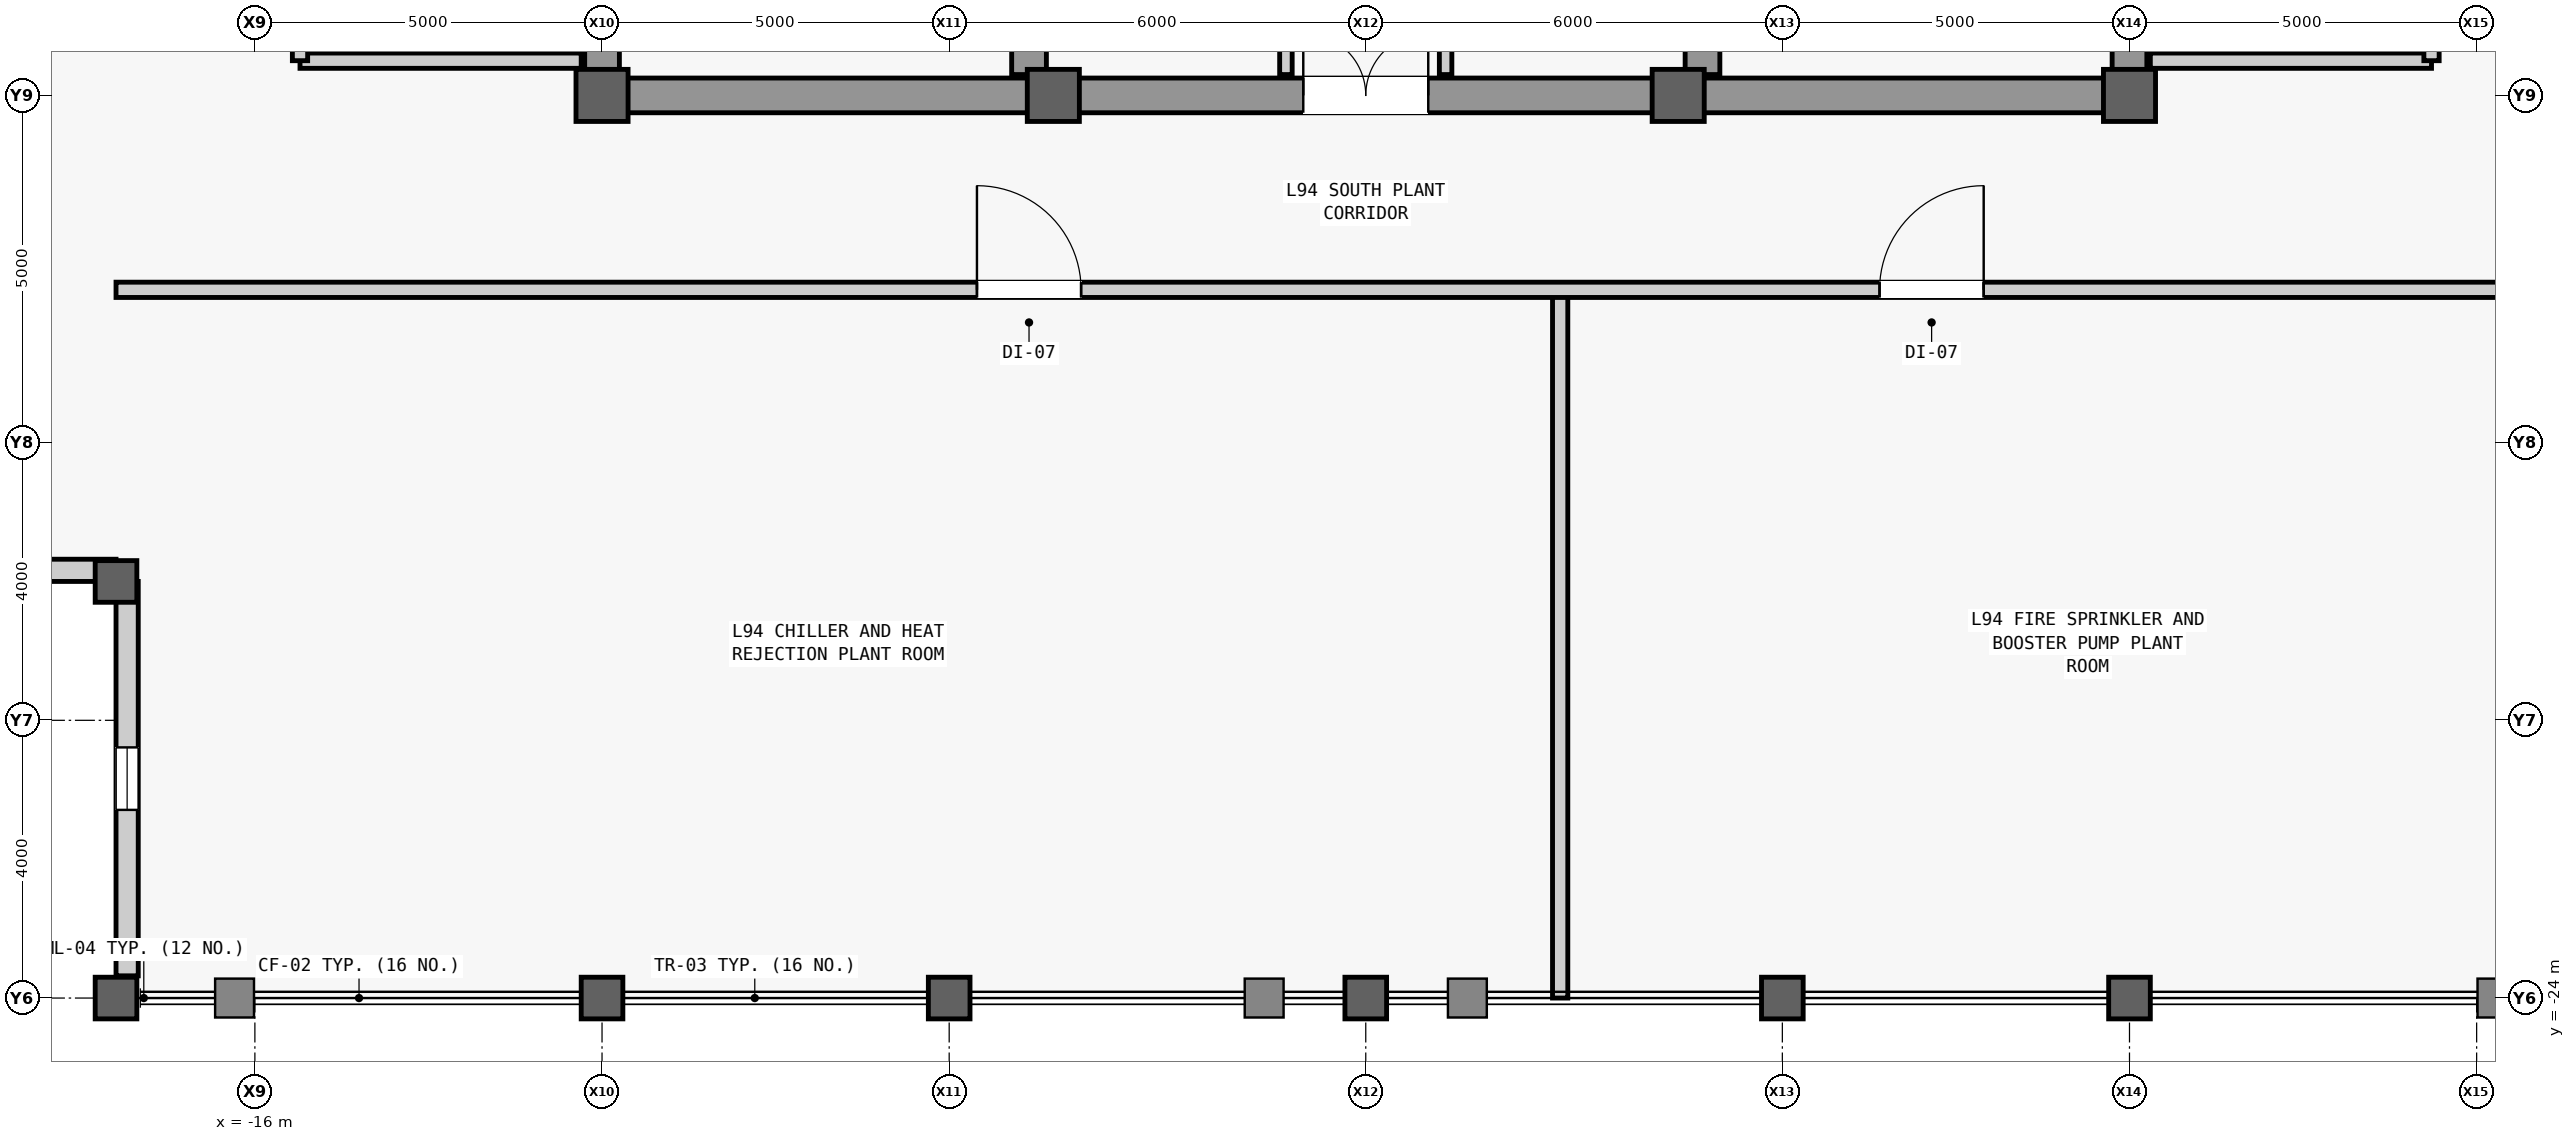
"""IFC4 building model, lengths in metres.
Left out: names, types, materials, properties, quantities, classifications, styles, units other than length and angle.
Written with IfcOpenShell. Run it as: python <this file> out.ifc"""

import sys

from ifc_helpers import new_model, si_unit, direction, frame, frame_2d, origin, origin_2d, place, context, subcontext, project, spatial, rectangle, hollow_rectangle, extrude, source, transform, mapped, element, fill, save


model = new_model("IFC4")
c1 = context("Model", 3, precision=1e-05, world=origin(), true_north=direction((0.0, 1.0)))
c2 = subcontext(c1, "Body", "Model", "MODEL_VIEW")
j1 = project(units=[si_unit("LENGTHUNIT", "METRE"), si_unit("PLANEANGLEUNIT", "RADIAN")], contexts=[c1])
p1 = place(None, origin())
s1 = spatial("IfcSite", under=j1, at=p1, CompositionType="ELEMENT")
p2 = place(p1, origin())
s2 = spatial("IfcBuilding", under=s1, at=p2, CompositionType="ELEMENT")
p3 = place(p2, frame((0.0, 0.0, 399.5)))
s3 = spatial("IfcBuildingStorey", under=s2, at=p3, CompositionType="ELEMENT", Elevation=399.5)
m1 = source(origin(), c2, "Body", "SweptSolid", [
    extrude(rectangle(XDim=22.0, YDim=0.5, at=frame_2d((11.0, 0.0))), origin(), (0.0, 0.0, 1.0), 4.5),
])
p4 = place(p3, frame((-11.0, -11.0, 0.0), z_axis=(0.0, 0.0, 1.0), x_axis=(0.0, 1.0, 0.0)))
e1 = element("IfcWall", 1, at=p4, inside=s3, PredefinedType="SHEAR", context=c2, shape_type="MappedRepresentation", body=[
    mapped(m1, transform((0.0, 0.0, 0.0), scale=1.0)),
])
m2 = source(origin(), c2, "Body", "SweptSolid", [
    extrude(rectangle(XDim=1.1, YDim=2.2, at=frame_2d((0.55, 1.1))), frame((0.0, 0.26, 0.0), z_axis=(0.0, -1.0, 0.0), x_axis=(1.0, 0.0, 0.0)), (0.0, 0.0, 1.0), 0.52),
])
p5 = place(p4, frame((0.8, 0.0, 0.0)))
e2 = element("IfcOpeningElement", 2, at=p5, cuts=e1, PredefinedType="OPENING", context=c2, shape_type="MappedRepresentation", body=[
    mapped(m2, transform((0.0, 0.0, 0.0), scale=1.0)),
])
p6 = place(p4, frame((12.5, 0.0, 0.0)))
e3 = element("IfcOpeningElement", 3, at=p6, cuts=e1, PredefinedType="OPENING", context=c2, shape_type="MappedRepresentation", body=[
    mapped(m2, transform((0.0, 0.0, 0.0), scale=1.0)),
])
m3 = source(origin(), c2, "Body", "SweptSolid", [
    extrude(rectangle(XDim=0.9, YDim=2.15, at=frame_2d((0.45, 1.075))), frame((0.0, 0.26, 0.0), z_axis=(0.0, -1.0, 0.0), x_axis=(1.0, 0.0, 0.0)), (0.0, 0.0, 1.0), 0.52),
])
p7 = place(p4, frame((7.575, 0.0, 0.0)))
e4 = element("IfcOpeningElement", 4, at=p7, cuts=e1, PredefinedType="OPENING", context=c2, shape_type="MappedRepresentation", body=[
    mapped(m3, transform((0.0, 0.0, 0.0), scale=1.0)),
])
m4 = source(origin(), c2, "Body", "SweptSolid", [
    extrude(rectangle(XDim=1.3, YDim=2.3, at=frame_2d((0.65, 1.15))), frame((0.0, 0.26, 0.0), z_axis=(0.0, -1.0, 0.0), x_axis=(1.0, 0.0, 0.0)), (0.0, 0.0, 1.0), 0.52),
])
p8 = place(p4, frame((2.7, 0.0, 0.0)))
e5 = element("IfcOpeningElement", 5, at=p8, cuts=e1, PredefinedType="OPENING", context=c2, shape_type="MappedRepresentation", body=[
    mapped(m4, transform((0.0, 0.0, 0.0), scale=1.0)),
])
p9 = place(p3, frame((11.0, -11.0, 0.0), z_axis=(0.0, 0.0, 1.0), x_axis=(0.0, 1.0, 0.0)))
e6 = element("IfcWall", 6, at=p9, inside=s3, PredefinedType="SHEAR", context=c2, shape_type="MappedRepresentation", body=[
    mapped(m1, transform((0.0, 0.0, 0.0), scale=1.0)),
])
p10 = place(p9, frame((0.8, 0.0, 0.0)))
e7 = element("IfcOpeningElement", 7, at=p10, cuts=e6, PredefinedType="OPENING", context=c2, shape_type="MappedRepresentation", body=[
    mapped(m2, transform((0.0, 0.0, 0.0), scale=1.0)),
])
p11 = place(p9, frame((7.575, 0.0, 0.0)))
e8 = element("IfcOpeningElement", 8, at=p11, cuts=e6, PredefinedType="OPENING", context=c2, shape_type="MappedRepresentation", body=[
    mapped(m3, transform((0.0, 0.0, 0.0), scale=1.0)),
])
p12 = place(p9, frame((2.7, 0.0, 0.0)))
e9 = element("IfcOpeningElement", 9, at=p12, cuts=e6, PredefinedType="OPENING", context=c2, shape_type="MappedRepresentation", body=[
    mapped(m4, transform((0.0, 0.0, 0.0), scale=1.0)),
])
p13 = place(p9, frame((13.35, 0.0, 0.0)))
e10 = element("IfcOpeningElement", 10, at=p13, cuts=e6, PredefinedType="OPENING", context=c2, shape_type="MappedRepresentation", body=[
    mapped(m4, transform((0.0, 0.0, 0.0), scale=1.0)),
])
m5 = source(origin(), c2, "Body", "SweptSolid", [
    extrude(rectangle(XDim=21.4, YDim=0.5, at=frame_2d((10.7, 0.0))), origin(), (0.0, 0.0, 1.0), 4.5),
])
for number, where, z_axis, x_axis in (
    (11, (-4.85, -10.7, 0.0), (0.0, 0.0, 1.0), (0.0, 1.0, 0.0)),
    (12, (4.85, -10.7, 0.0), (0.0, 0.0, 1.0), (0.0, 1.0, 0.0)),
):
    element("IfcWall", number, at=place(p3, frame(where, z_axis=z_axis, x_axis=x_axis)), inside=s3, PredefinedType="SHEAR", context=c2, shape_type="MappedRepresentation", body=[
        mapped(m5, transform((0.0, 0.0, 0.0), scale=1.0)),
    ])
m6 = source(origin(), c2, "Body", "SweptSolid", [
    extrude(rectangle(XDim=5.9, YDim=0.5, at=frame_2d((2.95, 0.0))), origin(), (0.0, 0.0, 1.0), 4.5),
])
for number, where, z_axis, x_axis in (
    (13, (-10.75, -11.0, 0.0), (0.0, 0.0, 1.0), (1.0, 0.0, 0.0)),
    (14, (4.85, -11.0, 0.0), (0.0, 0.0, 1.0), (1.0, 0.0, 0.0)),
):
    element("IfcWall", number, at=place(p3, frame(where, z_axis=z_axis, x_axis=x_axis)), inside=s3, PredefinedType="SHEAR", context=c2, shape_type="MappedRepresentation", body=[
        mapped(m6, transform((0.0, 0.0, 0.0), scale=1.0)),
    ])
m7 = source(origin(), c2, "Body", "SweptSolid", [
    extrude(rectangle(XDim=9.2, YDim=0.5, at=frame_2d((4.6, 0.0))), origin(), (0.0, 0.0, 1.0), 4.5),
])
p14 = place(p3, frame((-4.6, -11.0, 0.0), z_axis=(0.0, 0.0, 1.0), x_axis=(1.0, 0.0, 0.0)))
e15 = element("IfcWall", 15, at=p14, inside=s3, PredefinedType="SHEAR", context=c2, shape_type="MappedRepresentation", body=[
    mapped(m7, transform((0.0, 0.0, 0.0), scale=1.0)),
])
m8 = source(origin(), c2, "Body", "SweptSolid", [
    extrude(rectangle(XDim=1.8, YDim=2.25, at=frame_2d((0.9, 1.125))), frame((0.0, 0.26, 0.0), z_axis=(0.0, -1.0, 0.0), x_axis=(1.0, 0.0, 0.0)), (0.0, 0.0, 1.0), 0.52),
])
p15 = place(p14, frame((3.7, 0.0, 0.0)))
e16 = element("IfcOpeningElement", 16, at=p15, cuts=e15, PredefinedType="OPENING", context=c2, shape_type="MappedRepresentation", body=[
    mapped(m8, transform((0.0, 0.0, 0.0), scale=1.0)),
])
m9 = source(origin(), c2, "Body", "SweptSolid", [
    extrude(hollow_rectangle(XDim=0.6, YDim=0.6, WallThickness=0.035, at=origin_2d()), origin(), (0.0, 0.0, 1.0), 4.8),
])
for number, where, z_axis, x_axis in (
    (17, (-18.0, -24.0, 0.0), (0.0, 0.0, 1.0), (1.0, 0.0, 0.0)),
    (18, (-18.0, -18.0, 0.0), (0.0, 0.0, 1.0), (1.0, 0.0, 0.0)),
    (19, (-11.0, -24.0, 0.0), (0.0, 0.0, 1.0), (1.0, 0.0, 0.0)),
):
    element("IfcColumn", number, at=place(p3, frame(where, z_axis=z_axis, x_axis=x_axis)), inside=s3, PredefinedType="COLUMN", context=c2, shape_type="MappedRepresentation", body=[
        mapped(m9, transform((0.0, 0.0, 0.0), scale=1.0)),
    ])
m10 = source(origin(), c2, "Body", "SweptSolid", [
    extrude(rectangle(XDim=0.75, YDim=0.75, at=origin_2d()), origin(), (0.0, 0.0, 1.0), 4.8),
])
p16 = place(p3, frame((-11.0, -11.0, 0.0), z_axis=(0.0, 0.0, 1.0), x_axis=(1.0, 0.0, 0.0)))
e20 = element("IfcColumn", 20, at=p16, inside=s3, PredefinedType="COLUMN", context=c2, shape_type="MappedRepresentation", body=[
    mapped(m10, transform((0.0, 0.0, 0.0), scale=1.0)),
])
p17 = place(p3, frame((-6.0, -24.0, 0.0), z_axis=(0.0, 0.0, 1.0), x_axis=(1.0, 0.0, 0.0)))
e21 = element("IfcColumn", 21, at=p17, inside=s3, PredefinedType="COLUMN", context=c2, shape_type="MappedRepresentation", body=[
    mapped(m9, transform((0.0, 0.0, 0.0), scale=1.0)),
])
p18 = place(p3, frame((-4.5, -11.0, 0.0), z_axis=(0.0, 0.0, 1.0), x_axis=(1.0, 0.0, 0.0)))
e22 = element("IfcColumn", 22, at=p18, inside=s3, PredefinedType="COLUMN", context=c2, shape_type="MappedRepresentation", body=[
    mapped(m10, transform((0.0, 0.0, 0.0), scale=1.0)),
])
p19 = place(p3, frame((0.0, -24.0, 0.0), z_axis=(0.0, 0.0, 1.0), x_axis=(1.0, 0.0, 0.0)))
e23 = element("IfcColumn", 23, at=p19, inside=s3, PredefinedType="COLUMN", context=c2, shape_type="MappedRepresentation", body=[
    mapped(m9, transform((0.0, 0.0, 0.0), scale=1.0)),
])
p20 = place(p3, frame((4.5, -11.0, 0.0), z_axis=(0.0, 0.0, 1.0), x_axis=(1.0, 0.0, 0.0)))
e24 = element("IfcColumn", 24, at=p20, inside=s3, PredefinedType="COLUMN", context=c2, shape_type="MappedRepresentation", body=[
    mapped(m10, transform((0.0, 0.0, 0.0), scale=1.0)),
])
for number, where, z_axis, x_axis in (
    (25, (6.0, -24.0, 0.0), (0.0, 0.0, 1.0), (1.0, 0.0, 0.0)),
    (26, (11.0, -24.0, 0.0), (0.0, 0.0, 1.0), (1.0, 0.0, 0.0)),
):
    element("IfcColumn", number, at=place(p3, frame(where, z_axis=z_axis, x_axis=x_axis)), inside=s3, PredefinedType="COLUMN", context=c2, shape_type="MappedRepresentation", body=[
        mapped(m9, transform((0.0, 0.0, 0.0), scale=1.0)),
    ])
p21 = place(p3, frame((11.0, -11.0, 0.0), z_axis=(0.0, 0.0, 1.0), x_axis=(1.0, 0.0, 0.0)))
e27 = element("IfcColumn", 27, at=p21, inside=s3, PredefinedType="COLUMN", context=c2, shape_type="MappedRepresentation", body=[
    mapped(m10, transform((0.0, 0.0, 0.0), scale=1.0)),
])
m11 = source(origin(), c2, "Body", "SweptSolid", [
    extrude(rectangle(XDim=5.68, YDim=0.32, at=frame_2d((2.84, 0.0))), origin(), (0.0, 0.0, 1.0), 3.951),
])
p22 = place(p3, frame((-18.0, -17.84, 0.0), z_axis=(0.0, 0.0, 1.0), x_axis=(-1.0, 0.0, 0.0)))
e28 = element("IfcWall", 28, at=p22, inside=s3, PredefinedType="STANDARD", context=c2, shape_type="MappedRepresentation", body=[
    mapped(m11, transform((0.0, 0.0, 0.0), scale=1.0)),
])
m12 = source(origin(), c2, "Body", "SweptSolid", [
    extrude(rectangle(XDim=0.9, YDim=2.4, at=frame_2d((0.45, 1.2))), frame((0.0, 0.17, 0.0), z_axis=(0.0, -1.0, 0.0), x_axis=(1.0, 0.0, 0.0)), (0.0, 0.0, 1.0), 0.34),
])
p23 = place(p22, frame((2.39, 0.0, 0.7)))
e29 = element("IfcOpeningElement", 29, at=p23, cuts=e28, PredefinedType="OPENING", context=c2, shape_type="MappedRepresentation", body=[
    mapped(m12, transform((0.0, 0.0, 0.0), scale=1.0)),
])
p24 = place(p3, frame((-17.84, -23.68, 0.0), z_axis=(0.0, 0.0, 1.0), x_axis=(0.0, 1.0, 0.0)))
e30 = element("IfcWall", 30, at=p24, inside=s3, PredefinedType="STANDARD", context=c2, shape_type="MappedRepresentation", body=[
    mapped(m11, transform((0.0, 0.0, 0.0), scale=1.0)),
])
p25 = place(p24, frame((2.39, 0.0, 0.7)))
e31 = element("IfcOpeningElement", 31, at=p25, cuts=e30, PredefinedType="OPENING", context=c2, shape_type="MappedRepresentation", body=[
    mapped(m12, transform((0.0, 0.0, 0.0), scale=1.0)),
])
m13 = source(origin(), c2, "Body", "SweptSolid", [
    extrude(rectangle(XDim=4.05, YDim=0.22, at=frame_2d((2.025, 0.0))), origin(), (0.0, 0.0, 1.0), 4.5),
])
p26 = place(p3, frame((-15.35, -10.5, 0.0), z_axis=(0.0, 0.0, 1.0), x_axis=(1.0, 0.0, 0.0)))
e32 = element("IfcWall", 32, at=p26, inside=s3, PredefinedType="PARTITIONING", context=c2, shape_type="MappedRepresentation", body=[
    mapped(m13, transform((0.0, 0.0, 0.0), scale=1.0)),
])
m14 = source(origin(), c2, "Body", "SweptSolid", [
    extrude(rectangle(XDim=4.4, YDim=0.22, at=frame_2d((2.2, 0.0))), origin(), (0.0, 0.0, 1.0), 4.5),
])
p27 = place(p3, frame((-15.35, -10.5, 0.0), z_axis=(0.0, 0.0, 1.0), x_axis=(0.0, 1.0, 0.0)))
e33 = element("IfcWall", 33, at=p27, inside=s3, PredefinedType="PARTITIONING", context=c2, shape_type="MappedRepresentation", body=[
    mapped(m14, transform((0.0, 0.0, 0.0), scale=1.0)),
])
m15 = source(origin(), c2, "Body", "SweptSolid", [
    extrude(rectangle(XDim=1.2, YDim=2.2, at=frame_2d((0.6, 1.1))), frame((0.0, 0.12, 0.0), z_axis=(0.0, -1.0, 0.0), x_axis=(1.0, 0.0, 0.0)), (0.0, 0.0, 1.0), 0.24),
])
p28 = place(p27, frame((1.6, 0.0, 0.0)))
e34 = element("IfcOpeningElement", 34, at=p28, cuts=e33, PredefinedType="OPENING", context=c2, shape_type="MappedRepresentation", body=[
    mapped(m15, transform((0.0, 0.0, 0.0), scale=1.0)),
])
p29 = place(p3, frame((11.3, -10.5, 0.0), z_axis=(0.0, 0.0, 1.0), x_axis=(1.0, 0.0, 0.0)))
e35 = element("IfcWall", 35, at=p29, inside=s3, PredefinedType="PARTITIONING", context=c2, shape_type="MappedRepresentation", body=[
    mapped(m13, transform((0.0, 0.0, 0.0), scale=1.0)),
])
p30 = place(p3, frame((15.35, -10.5, 0.0), z_axis=(0.0, 0.0, 1.0), x_axis=(0.0, 1.0, 0.0)))
e36 = element("IfcWall", 36, at=p30, inside=s3, PredefinedType="PARTITIONING", context=c2, shape_type="MappedRepresentation", body=[
    mapped(m14, transform((0.0, 0.0, 0.0), scale=1.0)),
])
p31 = place(p30, frame((1.6, 0.0, 0.0)))
e37 = element("IfcOpeningElement", 37, at=p31, cuts=e36, PredefinedType="OPENING", context=c2, shape_type="MappedRepresentation", body=[
    mapped(m15, transform((0.0, 0.0, 0.0), scale=1.0)),
])
m16 = source(origin(), c2, "Body", "SweptSolid", [
    extrude(rectangle(XDim=5.4, YDim=0.18, at=frame_2d((2.7, 0.0))), origin(), (0.0, 0.0, 1.0), 4.5),
])
p32 = place(p3, frame((-1.15, -10.7, 0.0), z_axis=(0.0, 0.0, 1.0), x_axis=(0.0, 1.0, 0.0)))
e38 = element("IfcWall", 38, at=p32, inside=s3, PredefinedType="PARTITIONING", context=c2, shape_type="MappedRepresentation", body=[
    mapped(m16, transform((0.0, 0.0, 0.0), scale=1.0)),
])
m17 = source(origin(), c2, "Body", "SweptSolid", [
    extrude(rectangle(XDim=0.9, YDim=2.15, at=frame_2d((0.45, 1.075))), frame((0.0, 0.1, 0.0), z_axis=(0.0, -1.0, 0.0), x_axis=(1.0, 0.0, 0.0)), (0.0, 0.0, 1.0), 0.2),
])
p33 = place(p32, frame((1.15, 0.0, 0.0)))
e39 = element("IfcOpeningElement", 39, at=p33, cuts=e38, PredefinedType="OPENING", context=c2, shape_type="MappedRepresentation", body=[
    mapped(m17, transform((0.0, 0.0, 0.0), scale=1.0)),
])
p34 = place(p32, frame((3.85, 0.0, 0.0)))
e40 = element("IfcOpeningElement", 40, at=p34, cuts=e38, PredefinedType="OPENING", context=c2, shape_type="MappedRepresentation", body=[
    mapped(m17, transform((0.0, 0.0, 0.0), scale=1.0)),
])
p35 = place(p3, frame((1.15, -10.7, 0.0), z_axis=(0.0, 0.0, 1.0), x_axis=(0.0, 1.0, 0.0)))
e41 = element("IfcWall", 41, at=p35, inside=s3, PredefinedType="PARTITIONING", context=c2, shape_type="MappedRepresentation", body=[
    mapped(m16, transform((0.0, 0.0, 0.0), scale=1.0)),
])
p36 = place(p35, frame((2.25, 0.0, 0.0)))
e42 = element("IfcOpeningElement", 42, at=p36, cuts=e41, PredefinedType="OPENING", context=c2, shape_type="MappedRepresentation", body=[
    mapped(m17, transform((0.0, 0.0, 0.0), scale=1.0)),
])
m18 = source(origin(), c2, "Body", "SweptSolid", [
    extrude(rectangle(XDim=10.2, YDim=0.22, at=frame_2d((5.1, 0.0))), origin(), (0.0, 0.0, 1.0), 4.5),
])
p37 = place(p3, frame((2.8, -24.0, 0.0), z_axis=(0.0, 0.0, 1.0), x_axis=(0.0, 1.0, 0.0)))
e43 = element("IfcWall", 43, at=p37, inside=s3, PredefinedType="PARTITIONING", context=c2, shape_type="MappedRepresentation", body=[
    mapped(m18, transform((0.0, 0.0, 0.0), scale=1.0)),
])
m19 = source(origin(), c2, "Body", "SweptSolid", [
    extrude(rectangle(XDim=36.0, YDim=0.22, at=frame_2d((18.0, 0.0))), origin(), (0.0, 0.0, 1.0), 4.5),
])
p38 = place(p3, frame((-18.0, -13.8, 0.0), z_axis=(0.0, 0.0, 1.0), x_axis=(1.0, 0.0, 0.0)))
e44 = element("IfcWall", 44, at=p38, inside=s3, PredefinedType="PARTITIONING", context=c2, shape_type="MappedRepresentation", body=[
    mapped(m19, transform((0.0, 0.0, 0.0), scale=1.0)),
])
m20 = source(origin(), c2, "Body", "SweptSolid", [
    extrude(rectangle(XDim=1.5, YDim=2.3, at=frame_2d((0.75, 1.15))), frame((0.0, 0.12, 0.0), z_axis=(0.0, -1.0, 0.0), x_axis=(1.0, 0.0, 0.0)), (0.0, 0.0, 1.0), 0.24),
])
p39 = place(p38, frame((12.4, 0.0, 0.0)))
e45 = element("IfcOpeningElement", 45, at=p39, cuts=e44, PredefinedType="OPENING", context=c2, shape_type="MappedRepresentation", body=[
    mapped(m20, transform((0.0, 0.0, 0.0), scale=1.0)),
])
p40 = place(p38, frame((25.4, 0.0, 0.0)))
e46 = element("IfcOpeningElement", 46, at=p40, cuts=e44, PredefinedType="OPENING", context=c2, shape_type="MappedRepresentation", body=[
    mapped(m20, transform((0.0, 0.0, 0.0), scale=1.0)),
])
m21 = source(origin(), c2, "Body", "SweptSolid", [
    extrude(rectangle(XDim=0.9, YDim=2.4, at=frame_2d((0.45, 1.2))), frame((0.0, 0.03, 0.0), z_axis=(0.0, -1.0, 0.0), x_axis=(1.0, 0.0, 0.0)), (0.0, 0.0, 1.0), 0.06),
])
p41 = place(p25, origin())
e47 = element("IfcWindow", 47, at=p41, inside=s3, PartitioningType="SINGLE_PANEL", PredefinedType="WINDOW", context=c2, shape_type="MappedRepresentation", body=[
    mapped(m21, transform((0.0, 0.0, 0.0), scale=1.0)),
])
fill(e31, e47)
m22 = source(origin(), c2, "Body", "SweptSolid", [
    extrude(rectangle(XDim=1.8, YDim=2.25, at=frame_2d((0.9, 1.125))), frame((0.0, 0.025, 0.0), z_axis=(0.0, -1.0, 0.0), x_axis=(1.0, 0.0, 0.0)), (0.0, 0.0, 1.0), 0.05),
])
p42 = place(p15, origin())
e48 = element("IfcDoor", 48, at=p42, inside=s3, OperationType="SINGLE_SWING_LEFT", PredefinedType="DOOR", context=c2, shape_type="MappedRepresentation", body=[
    mapped(m22, transform((0.0, 0.0, 0.0), scale=1.0)),
])
fill(e16, e48)
m23 = source(origin(), c2, "Body", "SweptSolid", [
    extrude(rectangle(XDim=1.5, YDim=2.3, at=frame_2d((0.75, 1.15))), frame((0.0, 0.025, 0.0), z_axis=(0.0, -1.0, 0.0), x_axis=(1.0, 0.0, 0.0)), (0.0, 0.0, 1.0), 0.05),
])
p43 = place(p39, origin())
e49 = element("IfcDoor", 49, at=p43, inside=s3, OperationType="SINGLE_SWING_LEFT", PredefinedType="DOOR", context=c2, shape_type="MappedRepresentation", body=[
    mapped(m23, transform((0.0, 0.0, 0.0), scale=1.0)),
])
fill(e45, e49)
p44 = place(p40, origin())
e50 = element("IfcDoor", 50, at=p44, inside=s3, OperationType="SINGLE_SWING_RIGHT", PredefinedType="DOOR", context=c2, shape_type="MappedRepresentation", body=[
    mapped(m23, transform((0.0, 0.0, 0.0), scale=1.0)),
])
fill(e46, e50)
save(model, sys.argv[1])
